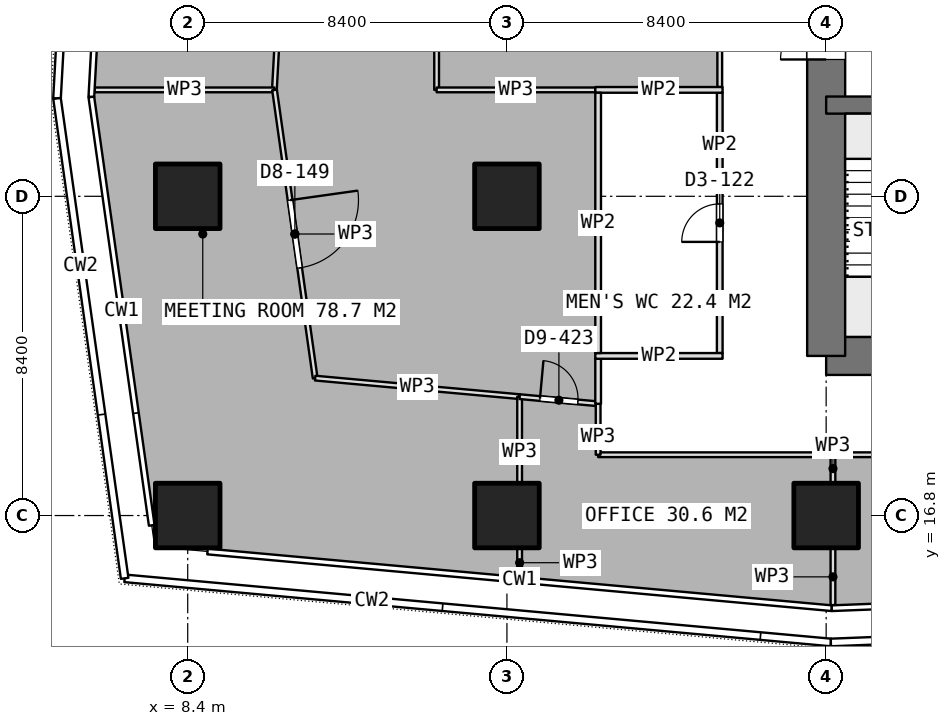
"""IFC4 building model, lengths in metres.
Left out: names, types, materials, properties, quantities, classifications, styles, units other than length and angle.
Written with IfcOpenShell. Run it as: python <this file> out.ifc"""

import sys

from ifc_helpers import new_model, si_unit, direction, frame, frame_2d, origin, origin_2d, place, context, subcontext, project, spatial, rectangle, extrude, element, fill, save


model = new_model("IFC4")
c1 = context("Model", 3, precision=1e-05, world=origin(), true_north=direction((0.0, 1.0)))
c2 = subcontext(c1, "Body", "Model", "MODEL_VIEW")
j1 = project(units=[si_unit("LENGTHUNIT", "METRE"), si_unit("PLANEANGLEUNIT", "RADIAN")], contexts=[c1])
p1 = place(None, origin())
s1 = spatial("IfcSite", under=j1, at=p1, CompositionType="ELEMENT")
p2 = place(p1, origin())
s2 = spatial("IfcBuilding", under=s1, at=p2, CompositionType="ELEMENT")
p3 = place(p2, frame((0.0, 0.0, 117.8)))
s3 = spatial("IfcBuildingStorey", under=s2, at=p3, CompositionType="ELEMENT", Elevation=117.8)
p4 = place(p3, frame((25.2, 21.0, 0.0), z_axis=(0.0, 0.0, 1.0), x_axis=(1.0, 0.0, 0.0)))
e1 = element("IfcWall", 1, at=p4, inside=s3, PredefinedType="SHEAR", context=c2, shape_type="SweptSolid", body=[
    extrude(rectangle(XDim=10.4, YDim=1.0, at=frame_2d((5.2, 0.0))), origin(), (0.0, 0.0, 1.0), 3.75),
])
p5 = place(p3, frame((25.2, 21.0, 0.0), z_axis=(0.0, 0.0, 1.0), x_axis=(0.0, 1.0, 0.0)))
e2 = element("IfcWall", 2, at=p5, inside=s3, PredefinedType="SHEAR", context=c2, shape_type="SweptSolid", body=[
    extrude(rectangle(XDim=25.2, YDim=1.0, at=frame_2d((12.6, 0.0))), origin(), (0.0, 0.0, 1.0), 3.75),
])
p6 = place(p5, frame((7.8, 0.0, 0.0)))
e3 = element("IfcOpeningElement", 3, at=p6, cuts=e2, PredefinedType="OPENING", context=c2, shape_type="SweptSolid", body=[
    extrude(rectangle(XDim=1.2, YDim=2.1, at=frame_2d((0.6, 1.05))), frame((0.0, 0.51, 0.0), z_axis=(0.0, -1.0, 0.0), x_axis=(1.0, 0.0, 0.0)), (0.0, 0.0, 1.0), 1.02),
])
p7 = place(p5, frame((14.25, 0.0, 0.0)))
e4 = element("IfcOpeningElement", 4, at=p7, cuts=e2, PredefinedType="OPENING", context=c2, shape_type="SweptSolid", body=[
    extrude(rectangle(XDim=0.9, YDim=2.1, at=frame_2d((0.45, 1.05))), frame((0.0, 0.51, 0.0), z_axis=(0.0, -1.0, 0.0), x_axis=(1.0, 0.0, 0.0)), (0.0, 0.0, 1.0), 1.02),
])
p8 = place(p5, frame((16.85, 0.0, 0.0)))
e5 = element("IfcOpeningElement", 5, at=p8, cuts=e2, PredefinedType="OPENING", context=c2, shape_type="SweptSolid", body=[
    extrude(rectangle(XDim=0.9, YDim=2.1, at=frame_2d((0.45, 1.05))), frame((0.0, 0.51, 0.0), z_axis=(0.0, -1.0, 0.0), x_axis=(1.0, 0.0, 0.0)), (0.0, 0.0, 1.0), 1.02),
])
p9 = place(p5, frame((19.025, 0.0, 0.0)))
e6 = element("IfcOpeningElement", 6, at=p9, cuts=e2, PredefinedType="OPENING", context=c2, shape_type="SweptSolid", body=[
    extrude(rectangle(XDim=1.2, YDim=2.1, at=frame_2d((0.6, 1.05))), frame((0.0, 0.51, 0.0), z_axis=(0.0, -1.0, 0.0), x_axis=(1.0, 0.0, 0.0)), (0.0, 0.0, 1.0), 1.02),
])
p10 = place(p3, frame((25.2, 27.6, 0.0), z_axis=(0.0, 0.0, 1.0), x_axis=(1.0, 0.0, 0.0)))
e7 = element("IfcWall", 7, at=p10, inside=s3, PredefinedType="SHEAR", context=c2, shape_type="SweptSolid", body=[
    extrude(rectangle(XDim=6.6, YDim=0.45, at=frame_2d((3.3, 0.0))), origin(), (0.0, 0.0, 1.0), 3.75),
])
p11 = place(p10, frame((4.975, 0.0, 0.0)))
e8 = element("IfcOpeningElement", 8, at=p11, cuts=e7, PredefinedType="OPENING", context=c2, shape_type="SweptSolid", body=[
    extrude(rectangle(XDim=1.2, YDim=2.1, at=frame_2d((0.6, 1.05))), frame((0.0, 0.235, 0.0), z_axis=(0.0, -1.0, 0.0), x_axis=(1.0, 0.0, 0.0)), (0.0, 0.0, 1.0), 0.47),
])
for number, where, z_axis, x_axis in (
    (9, (8.4, 16.8, 0.0), (0.0, 0.0, 1.0), (1.0, 0.0, 0.0)),
    (10, (8.4, 25.2, 0.0), (0.0, 0.0, 1.0), (1.0, 0.0, 0.0)),
    (11, (16.8, 16.8, 0.0), (0.0, 0.0, 1.0), (1.0, 0.0, 0.0)),
    (12, (16.8, 25.2, 0.0), (0.0, 0.0, 1.0), (1.0, 0.0, 0.0)),
    (13, (25.2, 16.8, 0.0), (0.0, 0.0, 1.0), (1.0, 0.0, 0.0)),
):
    element("IfcColumn", number, at=place(p3, frame(where, z_axis=z_axis, x_axis=x_axis)), inside=s3, PredefinedType="COLUMN", context=c2, shape_type="SweptSolid", body=[
        extrude(rectangle(XDim=1.7, YDim=1.7, at=origin_2d()), origin(), (0.0, 0.0, 1.0), 3.75),
    ])
for number, where, z_axis, x_axis in (
    (14, (19.125, 21.0, 0.0), (0.0, 0.0, 1.0), (1.0, 0.0, 0.0)),
    (15, (19.125, 28.0, 0.0), (0.0, 0.0, 1.0), (1.0, 0.0, 0.0)),
):
    element("IfcWall", number, at=place(p3, frame(where, z_axis=z_axis, x_axis=x_axis)), inside=s3, PredefinedType="PARTITIONING", context=c2, shape_type="SweptSolid", body=[
        extrude(rectangle(XDim=3.35, YDim=0.15, at=frame_2d((1.675, 0.0))), origin(), (0.0, 0.0, 1.0), 3.5),
    ])
p12 = place(p3, frame((19.2, 21.075, 0.0), z_axis=(0.0, 0.0, 1.0), x_axis=(0.0, 1.0, 0.0)))
e16 = element("IfcWall", 16, at=p12, inside=s3, PredefinedType="PARTITIONING", context=c2, shape_type="SweptSolid", body=[
    extrude(rectangle(XDim=6.85, YDim=0.15, at=frame_2d((3.425, 0.0))), origin(), (0.0, 0.0, 1.0), 3.5),
])
p13 = place(p3, frame((22.4, 21.075, 0.0), z_axis=(0.0, 0.0, 1.0), x_axis=(0.0, 1.0, 0.0)))
e17 = element("IfcWall", 17, at=p13, inside=s3, PredefinedType="PARTITIONING", context=c2, shape_type="SweptSolid", body=[
    extrude(rectangle(XDim=6.85, YDim=0.15, at=frame_2d((3.425, 0.0))), origin(), (0.0, 0.0, 1.0), 3.5),
])
p14 = place(p13, frame((2.925, 0.0, 0.0)))
e18 = element("IfcOpeningElement", 18, at=p14, cuts=e17, PredefinedType="OPENING", context=c2, shape_type="SweptSolid", body=[
    extrude(rectangle(XDim=1.0, YDim=2.1, at=frame_2d((0.5, 1.05))), frame((0.0, 0.085, 0.0), z_axis=(0.0, -1.0, 0.0), x_axis=(1.0, 0.0, 0.0)), (0.0, 0.0, 1.0), 0.17),
])
p15 = place(p3, frame((11.1, 35.634, 0.0), z_axis=(0.0, 0.0, 1.0), x_axis=(-0.054828018509, -0.998495812904, 0.0)))
e19 = element("IfcWall", 19, at=p15, inside=s3, PredefinedType="PARTITIONING", context=c2, shape_type="SweptSolid", body=[
    extrude(rectangle(XDim=7.646, YDim=0.125, at=frame_2d((3.823, 0.0))), origin(), (0.0, 0.0, 1.0), 3.5),
])
p16 = place(p15, frame((3.323, 0.0, 0.0)))
e20 = element("IfcOpeningElement", 20, at=p16, cuts=e19, PredefinedType="OPENING", context=c2, shape_type="SweptSolid", body=[
    extrude(rectangle(XDim=1.0, YDim=2.1, at=frame_2d((0.5, 1.05))), frame((0.0, 0.073, 0.0), z_axis=(0.0, -1.0, 0.0), x_axis=(1.0, 0.0, 0.0)), (0.0, 0.0, 1.0), 0.145),
])
p17 = place(p3, frame((10.681, 28.0, 0.0), z_axis=(0.0, 0.0, 1.0), x_axis=(-1.0, 0.0, 0.0)))
e21 = element("IfcWall", 21, at=p17, inside=s3, PredefinedType="PARTITIONING", context=c2, shape_type="SweptSolid", body=[
    extrude(rectangle(XDim=4.727, YDim=0.125, at=frame_2d((2.363, 0.0))), origin(), (0.0, 0.0, 1.0), 3.5),
])
p18 = place(p3, frame((10.685, 27.999, 0.0), z_axis=(0.0, 0.0, 1.0), x_axis=(0.139573309733, -0.990211740594, 0.0)))
e22 = element("IfcWall", 22, at=p18, inside=s3, PredefinedType="PARTITIONING", context=c2, shape_type="SweptSolid", body=[
    extrude(rectangle(XDim=7.658, YDim=0.125, at=frame_2d((3.829, 0.0))), origin(), (0.0, 0.0, 1.0), 3.5),
])
p19 = place(p18, frame((2.929, 0.0, 0.0)))
e23 = element("IfcOpeningElement", 23, at=p19, cuts=e22, PredefinedType="OPENING", context=c2, shape_type="SweptSolid", body=[
    extrude(rectangle(XDim=1.8, YDim=2.1, at=frame_2d((0.9, 1.05))), frame((0.0, 0.073, 0.0), z_axis=(0.0, -1.0, 0.0), x_axis=(1.0, 0.0, 0.0)), (0.0, 0.0, 1.0), 0.145),
])
p20 = place(p3, frame((11.754, 20.416, 0.0), z_axis=(0.0, 0.0, 1.0), x_axis=(0.995910967986, -0.090340156328, 0.0)))
e24 = element("IfcWall", 24, at=p20, inside=s3, PredefinedType="PARTITIONING", context=c2, shape_type="SweptSolid", body=[
    extrude(rectangle(XDim=5.402, YDim=0.125, at=frame_2d((2.701, 0.0))), origin(), (0.0, 0.0, 1.0), 3.5),
])
p21 = place(p3, frame((17.134, 19.928, 0.0), z_axis=(0.0, 0.0, 1.0), x_axis=(0.0, -1.0, 0.0)))
e25 = element("IfcWall", 25, at=p21, inside=s3, PredefinedType="PARTITIONING", context=c2, shape_type="SweptSolid", body=[
    extrude(rectangle(XDim=2.258, YDim=0.125, at=frame_2d((1.129, 0.0))), origin(), (0.0, 0.0, 1.0), 3.5),
])
p22 = place(p3, frame((17.134, 15.93, 0.0), z_axis=(0.0, 0.0, 1.0), x_axis=(0.0, -1.0, 0.0)))
e26 = element("IfcWall", 26, at=p22, inside=s3, PredefinedType="PARTITIONING", context=c2, shape_type="SweptSolid", body=[
    extrude(rectangle(XDim=0.742, YDim=0.125, at=frame_2d((0.371, 0.0))), origin(), (0.0, 0.0, 1.0), 3.5),
])
p23 = place(p3, frame((19.2, 18.4, 0.0), z_axis=(0.0, 0.0, 1.0), x_axis=(1.0, 0.0, 0.0)))
e27 = element("IfcWall", 27, at=p23, inside=s3, PredefinedType="PARTITIONING", context=c2, shape_type="SweptSolid", body=[
    extrude(rectangle(XDim=6.179, YDim=0.125, at=frame_2d((3.089, 0.0))), origin(), (0.0, 0.0, 1.0), 3.5),
])
p24 = place(p3, frame((25.379, 18.4, 0.0), z_axis=(0.0, 0.0, 1.0), x_axis=(0.0, -1.0, 0.0)))
e28 = element("IfcWall", 28, at=p24, inside=s3, PredefinedType="PARTITIONING", context=c2, shape_type="SweptSolid", body=[
    extrude(rectangle(XDim=0.73, YDim=0.125, at=frame_2d((0.365, 0.0))), origin(), (0.0, 0.0, 1.0), 3.5),
])
p25 = place(p3, frame((25.379, 15.93, 0.0), z_axis=(0.0, 0.0, 1.0), x_axis=(0.0, -1.0, 0.0)))
e29 = element("IfcWall", 29, at=p25, inside=s3, PredefinedType="PARTITIONING", context=c2, shape_type="SweptSolid", body=[
    extrude(rectangle(XDim=1.487, YDim=0.125, at=frame_2d((0.743, 0.0))), origin(), (0.0, 0.0, 1.0), 3.5),
])
p26 = place(p3, frame((17.135, 19.928, 0.0), z_axis=(0.0, 0.0, 1.0), x_axis=(0.995881616909, -0.090663140816, 0.0)))
e30 = element("IfcWall", 30, at=p26, inside=s3, PredefinedType="PARTITIONING", context=c2, shape_type="SweptSolid", body=[
    extrude(rectangle(XDim=2.073, YDim=0.125, at=frame_2d((1.037, 0.0))), origin(), (0.0, 0.0, 1.0), 3.5),
])
p27 = place(p26, frame((0.537, 0.0, 0.0)))
e31 = element("IfcOpeningElement", 31, at=p27, cuts=e30, PredefinedType="OPENING", context=c2, shape_type="SweptSolid", body=[
    extrude(rectangle(XDim=1.0, YDim=2.1, at=frame_2d((0.5, 1.05))), frame((0.0, 0.073, 0.0), z_axis=(0.0, -1.0, 0.0), x_axis=(1.0, 0.0, 0.0)), (0.0, 0.0, 1.0), 0.145),
])
p28 = place(p3, frame((19.2, 19.74, 0.0), z_axis=(0.0, 0.0, 1.0), x_axis=(0.0, -1.0, 0.0)))
e32 = element("IfcWall", 32, at=p28, inside=s3, PredefinedType="PARTITIONING", context=c2, shape_type="SweptSolid", body=[
    extrude(rectangle(XDim=1.34, YDim=0.125, at=frame_2d((0.67, 0.0))), origin(), (0.0, 0.0, 1.0), 3.5),
])
p29 = place(p3, frame((25.38, 18.4, 0.0), z_axis=(0.0, 0.0, 1.0), x_axis=(1.0, 0.0, 0.0)))
e33 = element("IfcWall", 33, at=p29, inside=s3, PredefinedType="PARTITIONING", context=c2, shape_type="SweptSolid", body=[
    extrude(rectangle(XDim=8.445, YDim=0.125, at=frame_2d((4.223, 0.0))), origin(), (0.0, 0.0, 1.0), 3.5),
])
p30 = place(p29, frame((3.723, 0.0, 0.0)))
e34 = element("IfcOpeningElement", 34, at=p30, cuts=e33, PredefinedType="OPENING", context=c2, shape_type="SweptSolid", body=[
    extrude(rectangle(XDim=1.0, YDim=2.1, at=frame_2d((0.5, 1.05))), frame((0.0, 0.073, 0.0), z_axis=(0.0, -1.0, 0.0), x_axis=(1.0, 0.0, 0.0)), (0.0, 0.0, 1.0), 0.145),
])
p31 = place(p3, frame((14.95, 28.0, 0.0), z_axis=(0.0, 0.0, 1.0), x_axis=(0.0, 1.0, 0.0)))
e35 = element("IfcWall", 35, at=p31, inside=s3, PredefinedType="PARTITIONING", context=c2, shape_type="SweptSolid", body=[
    extrude(rectangle(XDim=7.634, YDim=0.125, at=frame_2d((3.817, 0.0))), origin(), (0.0, 0.0, 1.0), 3.5),
])
p32 = place(p3, frame((22.4, 35.634, 0.0), z_axis=(0.0, 0.0, 1.0), x_axis=(0.0, -1.0, 0.0)))
e36 = element("IfcWall", 36, at=p32, inside=s3, PredefinedType="PARTITIONING", context=c2, shape_type="SweptSolid", body=[
    extrude(rectangle(XDim=7.559, YDim=0.125, at=frame_2d((3.78, 0.0))), origin(), (0.0, 0.0, 1.0), 3.5),
])
p33 = place(p32, frame((2.917, 0.0, 0.0)))
e37 = element("IfcOpeningElement", 37, at=p33, cuts=e36, PredefinedType="OPENING", context=c2, shape_type="SweptSolid", body=[
    extrude(rectangle(XDim=1.8, YDim=2.1, at=frame_2d((0.9, 1.05))), frame((0.0, 0.073, 0.0), z_axis=(0.0, -1.0, 0.0), x_axis=(1.0, 0.0, 0.0)), (0.0, 0.0, 1.0), 0.145),
])
p34 = place(p3, frame((19.125, 28.0, 0.0), z_axis=(0.0, 0.0, 1.0), x_axis=(-1.0, 0.0, 0.0)))
e38 = element("IfcWall", 38, at=p34, inside=s3, PredefinedType="PARTITIONING", context=c2, shape_type="SweptSolid", body=[
    extrude(rectangle(XDim=4.175, YDim=0.125, at=frame_2d((2.087, 0.0))), origin(), (0.0, 0.0, 1.0), 3.5),
])
p35 = place(p3, frame((19.2, 20.925, 0.0), z_axis=(0.0, 0.0, 1.0), x_axis=(0.0, -1.0, 0.0)))
e39 = element("IfcWall", 39, at=p35, inside=s3, PredefinedType="PARTITIONING", context=c2, shape_type="SweptSolid", body=[
    extrude(rectangle(XDim=1.185, YDim=0.15, at=frame_2d((0.593, 0.0))), origin(), (0.0, 0.0, 1.0), 3.5),
])
p36 = place(p6, origin())
e40 = element("IfcDoor", 40, at=p36, inside=s3, OperationType="SINGLE_SWING_LEFT", PredefinedType="DOOR", context=c2, shape_type="SweptSolid", body=[
    extrude(rectangle(XDim=1.2, YDim=2.1, at=frame_2d((0.6, 1.05))), frame((0.0, 0.025, 0.0), z_axis=(0.0, -1.0, 0.0), x_axis=(1.0, 0.0, 0.0)), (0.0, 0.0, 1.0), 0.05),
])
fill(e3, e40)
p37 = place(p14, origin())
e41 = element("IfcDoor", 41, at=p37, inside=s3, OperationType="SINGLE_SWING_LEFT", PredefinedType="DOOR", context=c2, shape_type="SweptSolid", body=[
    extrude(rectangle(XDim=1.0, YDim=2.1, at=frame_2d((0.5, 1.05))), frame((0.0, 0.025, 0.0), z_axis=(0.0, -1.0, 0.0), x_axis=(1.0, 0.0, 0.0)), (0.0, 0.0, 1.0), 0.05),
])
fill(e18, e41)
p38 = place(p19, origin())
e42 = element("IfcDoor", 42, at=p38, inside=s3, OperationType="DOUBLE_DOOR_SINGLE_SWING", PredefinedType="DOOR", context=c2, shape_type="SweptSolid", body=[
    extrude(rectangle(XDim=1.8, YDim=2.1, at=frame_2d((0.9, 1.05))), frame((0.0, 0.025, 0.0), z_axis=(0.0, -1.0, 0.0), x_axis=(1.0, 0.0, 0.0)), (0.0, 0.0, 1.0), 0.05),
])
fill(e23, e42)
p39 = place(p27, origin())
e43 = element("IfcDoor", 43, at=p39, inside=s3, OperationType="SINGLE_SWING_LEFT", PredefinedType="DOOR", context=c2, shape_type="SweptSolid", body=[
    extrude(rectangle(XDim=1.0, YDim=2.1, at=frame_2d((0.5, 1.05))), frame((0.0, 0.025, 0.0), z_axis=(0.0, -1.0, 0.0), x_axis=(1.0, 0.0, 0.0)), (0.0, 0.0, 1.0), 0.05),
])
fill(e31, e43)
save(model, sys.argv[1])
